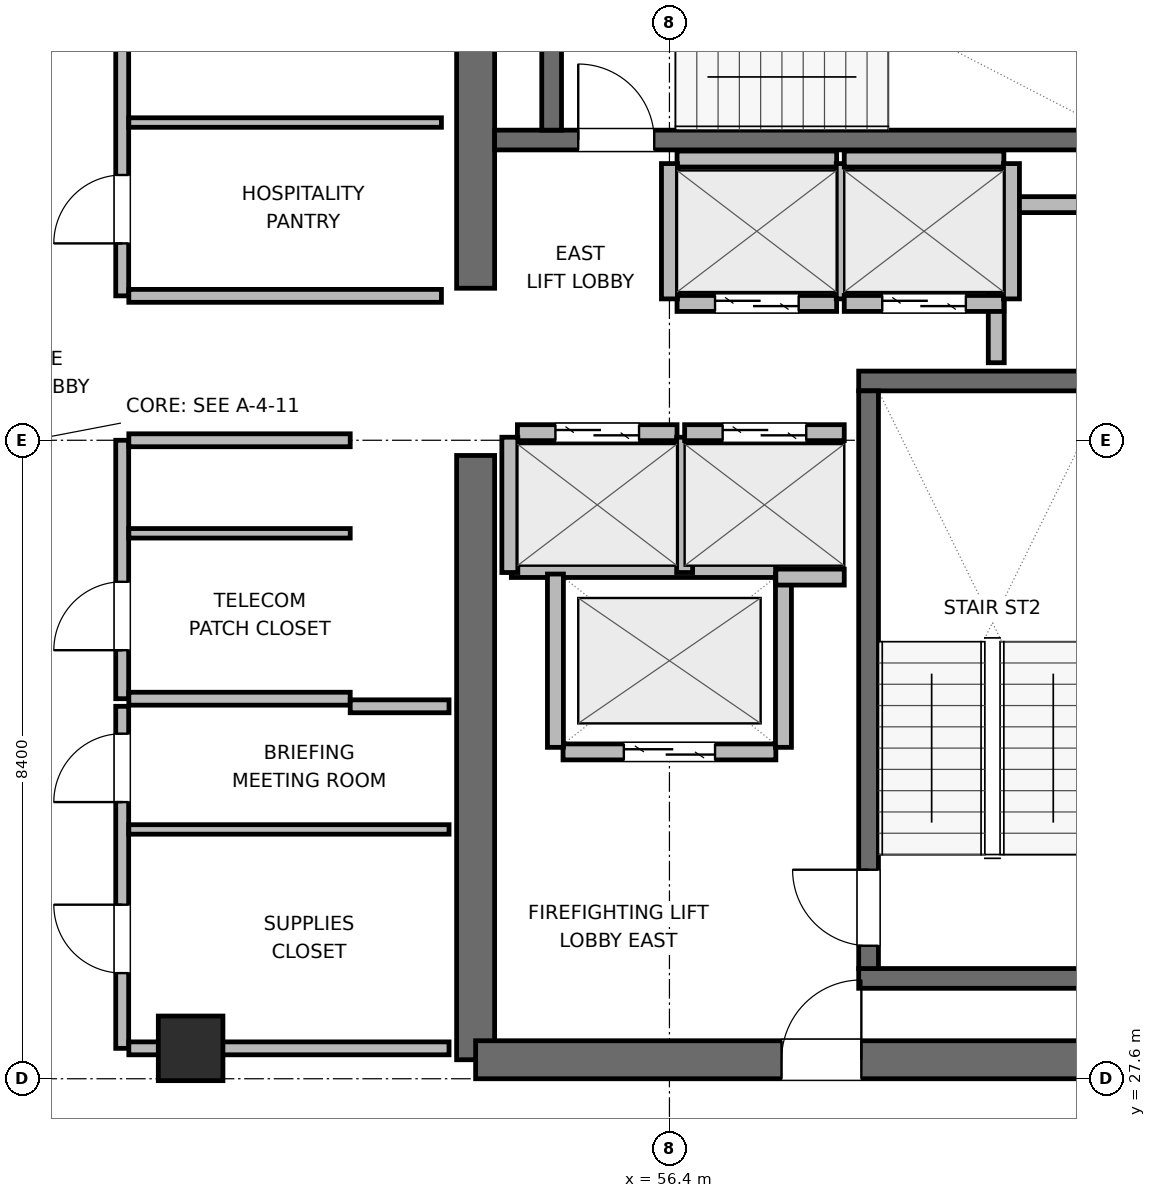
"""IFC4 building model, lengths in metres.
Left out: names, types, materials, properties, quantities, classifications, styles, units other than length and angle.
Written with IfcOpenShell. Run it as: python <this file> out.ifc"""

import sys

from ifc_helpers import new_model, si_unit, direction, frame, frame_2d, origin, origin_2d, place, context, subcontext, project, spatial, rectangle, extrude, element, fill, save


model = new_model("IFC4")
c1 = context("Model", 3, precision=1e-05, world=origin(), true_north=direction((0.0, 1.0)))
c2 = subcontext(c1, "Body", "Model", "MODEL_VIEW")
j1 = project(units=[si_unit("LENGTHUNIT", "METRE"), si_unit("PLANEANGLEUNIT", "RADIAN")], contexts=[c1])
p1 = place(None, origin())
s1 = spatial("IfcSite", under=j1, at=p1, CompositionType="ELEMENT")
p2 = place(p1, origin())
s2 = spatial("IfcBuilding", under=s1, at=p2, CompositionType="ELEMENT")
p3 = place(p2, frame((0.0, 0.0, 270.6)))
s3 = spatial("IfcBuildingStorey", under=s2, at=p3, CompositionType="ELEMENT", Elevation=270.6)
p4 = place(p3, frame((53.85, 27.85, 0.0), z_axis=(0.0, 0.0, 1.0), x_axis=(0.0, 1.0, 0.0)))
e1 = element("IfcWall", 1, at=p4, inside=s3, PredefinedType="SHEAR", context=c2, shape_type="SweptSolid", body=[
    extrude(rectangle(XDim=7.95, YDim=0.5, at=frame_2d((3.975, 0.0))), origin(), (0.0, 0.0, 1.0), 3.9),
])
p5 = place(p3, frame((53.85, 38.0, 0.0), z_axis=(0.0, 0.0, 1.0), x_axis=(0.0, 1.0, 0.0)))
e2 = element("IfcWall", 2, at=p5, inside=s3, PredefinedType="SHEAR", context=c2, shape_type="SweptSolid", body=[
    extrude(rectangle(XDim=6.15, YDim=0.5, at=frame_2d((3.075, 0.0))), origin(), (0.0, 0.0, 1.0), 3.9),
])
p6 = place(p3, frame((53.85, 27.85, 0.0), z_axis=(0.0, 0.0, 1.0), x_axis=(1.0, 0.0, 0.0)))
e3 = element("IfcWall", 3, at=p6, inside=s3, PredefinedType="SHEAR", context=c2, shape_type="SweptSolid", body=[
    extrude(rectangle(XDim=9.5, YDim=0.5, at=frame_2d((4.75, 0.0))), origin(), (0.0, 0.0, 1.0), 3.9),
])
p7 = place(p6, frame((4.025, 0.0, 0.0)))
e4 = element("IfcOpeningElement", 4, at=p7, cuts=e3, PredefinedType="OPENING", context=c2, shape_type="SweptSolid", body=[
    extrude(rectangle(XDim=1.05, YDim=2.04, at=frame_2d((0.525, 1.02))), frame((0.0, 0.26, 0.0), z_axis=(0.0, -1.0, 0.0), x_axis=(1.0, 0.0, 0.0)), (0.0, 0.0, 1.0), 0.52),
])
for number, where, z_axis, x_axis in (
    (5, (58.89, 28.92, 0.0), (0.0, 0.0, 1.0), (1.0, 0.0, 0.0)),
    (6, (58.89, 36.78, 0.0), (0.0, 0.0, 1.0), (1.0, 0.0, 0.0)),
):
    element("IfcWall", number, at=place(p3, frame(where, z_axis=z_axis, x_axis=x_axis)), inside=s3, PredefinedType="SHEAR", context=c2, shape_type="SweptSolid", body=[
        extrude(rectangle(XDim=4.21, YDim=0.26, at=frame_2d((2.105, 0.0))), origin(), (0.0, 0.0, 1.0), 3.9),
    ])
p8 = place(p3, frame((59.02, 29.05, 0.0), z_axis=(0.0, 0.0, 1.0), x_axis=(0.0, 1.0, 0.0)))
e7 = element("IfcWall", 7, at=p8, inside=s3, PredefinedType="SHEAR", context=c2, shape_type="SweptSolid", body=[
    extrude(rectangle(XDim=7.6, YDim=0.26, at=frame_2d((3.8, 0.0))), origin(), (0.0, 0.0, 1.0), 3.9),
])
p9 = place(p8, frame((0.3, 0.0, 0.0)))
e8 = element("IfcOpeningElement", 8, at=p9, cuts=e7, PredefinedType="OPENING", context=c2, shape_type="SweptSolid", body=[
    extrude(rectangle(XDim=1.0, YDim=2.04, at=frame_2d((0.5, 1.02))), frame((0.0, 0.14, 0.0), z_axis=(0.0, -1.0, 0.0), x_axis=(1.0, 0.0, 0.0)), (0.0, 0.0, 1.0), 0.28),
])
p10 = place(p3, frame((54.1, 39.95, 0.0), z_axis=(0.0, 0.0, 1.0), x_axis=(1.0, 0.0, 0.0)))
e9 = element("IfcWall", 9, at=p10, inside=s3, PredefinedType="SHEAR", context=c2, shape_type="SweptSolid", body=[
    extrude(rectangle(XDim=9.0, YDim=0.26, at=frame_2d((4.5, 0.0))), origin(), (0.0, 0.0, 1.0), 3.9),
])
p11 = place(p10, frame((1.1, 0.0, 0.0)))
e10 = element("IfcOpeningElement", 10, at=p11, cuts=e9, PredefinedType="OPENING", context=c2, shape_type="SweptSolid", body=[
    extrude(rectangle(XDim=1.0, YDim=2.04, at=frame_2d((0.5, 1.02))), frame((0.0, 0.14, 0.0), z_axis=(0.0, -1.0, 0.0), x_axis=(1.0, 0.0, 0.0)), (0.0, 0.0, 1.0), 0.28),
])
p12 = place(p3, frame((54.85, 40.08, 0.0), z_axis=(0.0, 0.0, 1.0), x_axis=(0.0, 1.0, 0.0)))
e11 = element("IfcWall", 11, at=p12, inside=s3, PredefinedType="SHEAR", context=c2, shape_type="SweptSolid", body=[
    extrude(rectangle(XDim=2.94, YDim=0.26, at=frame_2d((1.47, 0.0))), origin(), (0.0, 0.0, 1.0), 3.9),
])
p13 = place(p3, frame((50.1, 28.0, 0.0), z_axis=(0.0, 0.0, 1.0), x_axis=(1.0, 0.0, 0.0)))
e12 = element("IfcColumn", 12, at=p13, inside=s3, PredefinedType="COLUMN", context=c2, shape_type="SweptSolid", body=[
    extrude(rectangle(XDim=0.85, YDim=0.85, at=origin_2d()), origin(), (0.0, 0.0, 1.0), 3.9),
])
p14 = place(p3, frame((60.72, 39.1, 0.0), z_axis=(0.0, 0.0, 1.0), x_axis=(1.0, 0.0, 0.0)))
e13 = element("IfcWall", 13, at=p14, inside=s3, PredefinedType="PARTITIONING", context=c2, shape_type="SweptSolid", body=[
    extrude(rectangle(XDim=1.8, YDim=0.21, at=frame_2d((0.9, 0.0))), origin(), (0.0, 0.0, 1.0), 3.68),
])
p15 = place(p3, frame((60.7, 37.02, 0.0), z_axis=(0.0, 0.0, 1.0), x_axis=(0.0, 1.0, 0.0)))
e14 = element("IfcWall", 14, at=p15, inside=s3, PredefinedType="PARTITIONING", context=c2, shape_type="SweptSolid", body=[
    extrude(rectangle(XDim=1.96, YDim=0.21, at=frame_2d((0.98, 0.0))), origin(), (0.0, 0.0, 1.0), 3.68),
])
p16 = place(p3, frame((55.0, 31.9, 0.0), z_axis=(0.0, 0.0, 1.0), x_axis=(1.0, 0.0, 0.0)))
e15 = element("IfcWall", 15, at=p16, inside=s3, PredefinedType="PARTITIONING", context=c2, shape_type="SweptSolid", body=[
    extrude(rectangle(XDim=2.8, YDim=0.21, at=frame_2d((1.4, 0.0))), origin(), (0.0, 0.0, 1.0), 3.68),
])
p17 = place(p16, frame((0.8, 0.0, 0.0)))
e16 = element("IfcOpeningElement", 16, at=p17, cuts=e15, PredefinedType="OPENING", context=c2, shape_type="SweptSolid", body=[
    extrude(rectangle(XDim=1.2, YDim=2.04, at=frame_2d((0.6, 1.02))), frame((0.0, 0.115, 0.0), z_axis=(0.0, -1.0, 0.0), x_axis=(1.0, 0.0, 0.0)), (0.0, 0.0, 1.0), 0.23),
])
p18 = place(p3, frame((54.32, 34.3, 0.0), z_axis=(0.0, 0.0, 1.0), x_axis=(1.0, 0.0, 0.0)))
e17 = element("IfcWall", 17, at=p18, inside=s3, PredefinedType="PARTITIONING", context=c2, shape_type="SweptSolid", body=[
    extrude(rectangle(XDim=3.48, YDim=0.21, at=frame_2d((1.74, 0.0))), origin(), (0.0, 0.0, 1.0), 3.68),
])
for number, where, z_axis, x_axis in (
    (18, (54.9, 31.96, 0.0), (0.0, 0.0, 1.0), (0.0, 1.0, 0.0)),
    (19, (57.9, 31.96, 0.0), (0.0, 0.0, 1.0), (0.0, 1.0, 0.0)),
):
    element("IfcWall", number, at=place(p3, frame(where, z_axis=z_axis, x_axis=x_axis)), inside=s3, PredefinedType="PARTITIONING", context=c2, shape_type="SweptSolid", body=[
        extrude(rectangle(XDim=2.28, YDim=0.21, at=frame_2d((1.14, 0.0))), origin(), (0.0, 0.0, 1.0), 3.68),
    ])
p19 = place(p3, frame((54.4, 36.1, 0.0), z_axis=(0.0, 0.0, 1.0), x_axis=(1.0, 0.0, 0.0)))
e20 = element("IfcWall", 20, at=p19, inside=s3, PredefinedType="PARTITIONING", context=c2, shape_type="SweptSolid", body=[
    extrude(rectangle(XDim=2.1, YDim=0.21, at=frame_2d((1.05, 0.0))), origin(), (0.0, 0.0, 1.0), 3.68),
])
p20 = place(p19, frame((0.5, 0.0, 0.0)))
e21 = element("IfcOpeningElement", 21, at=p20, cuts=e20, PredefinedType="OPENING", context=c2, shape_type="SweptSolid", body=[
    extrude(rectangle(XDim=1.1, YDim=2.04, at=frame_2d((0.55, 1.02))), frame((0.0, 0.115, 0.0), z_axis=(0.0, -1.0, 0.0), x_axis=(1.0, 0.0, 0.0)), (0.0, 0.0, 1.0), 0.23),
])
for number, where, z_axis, x_axis in (
    (22, (54.3, 34.26, 0.0), (0.0, 0.0, 1.0), (0.0, 1.0, 0.0)),
    (23, (56.6, 34.26, 0.0), (0.0, 0.0, 1.0), (0.0, 1.0, 0.0)),
):
    element("IfcWall", number, at=place(p3, frame(where, z_axis=z_axis, x_axis=x_axis)), inside=s3, PredefinedType="PARTITIONING", context=c2, shape_type="SweptSolid", body=[
        extrude(rectangle(XDim=1.78, YDim=0.21, at=frame_2d((0.89, 0.0))), origin(), (0.0, 0.0, 1.0), 3.68),
    ])
p21 = place(p3, frame((56.6, 36.1, 0.0), z_axis=(0.0, 0.0, 1.0), x_axis=(1.0, 0.0, 0.0)))
e24 = element("IfcWall", 24, at=p21, inside=s3, PredefinedType="PARTITIONING", context=c2, shape_type="SweptSolid", body=[
    extrude(rectangle(XDim=2.1, YDim=0.21, at=frame_2d((1.05, 0.0))), origin(), (0.0, 0.0, 1.0), 3.68),
])
p22 = place(p21, frame((0.5, 0.0, 0.0)))
e25 = element("IfcOpeningElement", 25, at=p22, cuts=e24, PredefinedType="OPENING", context=c2, shape_type="SweptSolid", body=[
    extrude(rectangle(XDim=1.1, YDim=2.04, at=frame_2d((0.55, 1.02))), frame((0.0, 0.115, 0.0), z_axis=(0.0, -1.0, 0.0), x_axis=(1.0, 0.0, 0.0)), (0.0, 0.0, 1.0), 0.23),
])
p23 = place(p3, frame((57.8, 34.2, 0.0), z_axis=(0.0, 0.0, 1.0), x_axis=(1.0, 0.0, 0.0)))
e26 = element("IfcWall", 26, at=p23, inside=s3, PredefinedType="PARTITIONING", context=c2, shape_type="SweptSolid", body=[
    extrude(rectangle(XDim=0.9, YDim=0.21, at=frame_2d((0.45, 0.0))), origin(), (0.0, 0.0, 1.0), 3.68),
])
p24 = place(p3, frame((56.5, 37.8, 0.0), z_axis=(0.0, 0.0, 1.0), x_axis=(1.0, 0.0, 0.0)))
e27 = element("IfcWall", 27, at=p24, inside=s3, PredefinedType="PARTITIONING", context=c2, shape_type="SweptSolid", body=[
    extrude(rectangle(XDim=2.1, YDim=0.21, at=frame_2d((1.05, 0.0))), origin(), (0.0, 0.0, 1.0), 3.68),
])
p25 = place(p24, frame((0.5, 0.0, 0.0)))
e28 = element("IfcOpeningElement", 28, at=p25, cuts=e27, PredefinedType="OPENING", context=c2, shape_type="SweptSolid", body=[
    extrude(rectangle(XDim=1.1, YDim=2.04, at=frame_2d((0.55, 1.02))), frame((0.0, 0.115, 0.0), z_axis=(0.0, -1.0, 0.0), x_axis=(1.0, 0.0, 0.0)), (0.0, 0.0, 1.0), 0.23),
])
p26 = place(p3, frame((56.5, 39.7, 0.0), z_axis=(0.0, 0.0, 1.0), x_axis=(1.0, 0.0, 0.0)))
e29 = element("IfcWall", 29, at=p26, inside=s3, PredefinedType="PARTITIONING", context=c2, shape_type="SweptSolid", body=[
    extrude(rectangle(XDim=2.1, YDim=0.21, at=frame_2d((1.05, 0.0))), origin(), (0.0, 0.0, 1.0), 3.68),
])
for number, where, z_axis, x_axis in (
    (30, (56.4, 37.86, 0.0), (0.0, 0.0, 1.0), (0.0, 1.0, 0.0)),
    (31, (58.7, 37.86, 0.0), (0.0, 0.0, 1.0), (0.0, 1.0, 0.0)),
):
    element("IfcWall", number, at=place(p3, frame(where, z_axis=z_axis, x_axis=x_axis)), inside=s3, PredefinedType="PARTITIONING", context=c2, shape_type="SweptSolid", body=[
        extrude(rectangle(XDim=1.78, YDim=0.21, at=frame_2d((0.89, 0.0))), origin(), (0.0, 0.0, 1.0), 3.68),
    ])
p27 = place(p3, frame((58.7, 37.8, 0.0), z_axis=(0.0, 0.0, 1.0), x_axis=(1.0, 0.0, 0.0)))
e32 = element("IfcWall", 32, at=p27, inside=s3, PredefinedType="PARTITIONING", context=c2, shape_type="SweptSolid", body=[
    extrude(rectangle(XDim=2.1, YDim=0.21, at=frame_2d((1.05, 0.0))), origin(), (0.0, 0.0, 1.0), 3.68),
])
p28 = place(p27, frame((0.5, 0.0, 0.0)))
e33 = element("IfcOpeningElement", 33, at=p28, cuts=e32, PredefinedType="OPENING", context=c2, shape_type="SweptSolid", body=[
    extrude(rectangle(XDim=1.1, YDim=2.04, at=frame_2d((0.55, 1.02))), frame((0.0, 0.115, 0.0), z_axis=(0.0, -1.0, 0.0), x_axis=(1.0, 0.0, 0.0)), (0.0, 0.0, 1.0), 0.23),
])
p29 = place(p3, frame((58.7, 39.7, 0.0), z_axis=(0.0, 0.0, 1.0), x_axis=(1.0, 0.0, 0.0)))
e34 = element("IfcWall", 34, at=p29, inside=s3, PredefinedType="PARTITIONING", context=c2, shape_type="SweptSolid", body=[
    extrude(rectangle(XDim=2.1, YDim=0.21, at=frame_2d((1.05, 0.0))), origin(), (0.0, 0.0, 1.0), 3.68),
])
p30 = place(p3, frame((60.9, 37.86, 0.0), z_axis=(0.0, 0.0, 1.0), x_axis=(0.0, 1.0, 0.0)))
e35 = element("IfcWall", 35, at=p30, inside=s3, PredefinedType="PARTITIONING", context=c2, shape_type="SweptSolid", body=[
    extrude(rectangle(XDim=1.78, YDim=0.21, at=frame_2d((0.89, 0.0))), origin(), (0.0, 0.0, 1.0), 3.68),
])
p31 = place(p3, frame((49.2, 32.6, 0.0), z_axis=(0.0, 0.0, 1.0), x_axis=(0.0, 1.0, 0.0)))
e36 = element("IfcWall", 36, at=p31, inside=s3, PredefinedType="PARTITIONING", context=c2, shape_type="SweptSolid", body=[
    extrude(rectangle(XDim=3.4, YDim=0.17, at=frame_2d((1.7, 0.0))), origin(), (0.0, 0.0, 1.0), 3.68),
])
p32 = place(p31, frame((0.638, 0.0, 0.0)))
e37 = element("IfcOpeningElement", 37, at=p32, cuts=e36, PredefinedType="OPENING", context=c2, shape_type="SweptSolid", body=[
    extrude(rectangle(XDim=0.9, YDim=2.02, at=frame_2d((0.45, 1.01))), frame((0.0, 0.095, 0.0), z_axis=(0.0, -1.0, 0.0), x_axis=(1.0, 0.0, 0.0)), (0.0, 0.0, 1.0), 0.19),
])
for number, where, z_axis, x_axis in (
    (38, (49.287, 32.6, 0.0), (0.0, 0.0, 1.0), (1.0, 0.0, 0.0)),
    (39, (49.287, 36.0, 0.0), (0.0, 0.0, 1.0), (1.0, 0.0, 0.0)),
):
    element("IfcWall", number, at=place(p3, frame(where, z_axis=z_axis, x_axis=x_axis)), inside=s3, PredefinedType="PARTITIONING", context=c2, shape_type="SweptSolid", body=[
        extrude(rectangle(XDim=2.913, YDim=0.17, at=frame_2d((1.457, 0.0))), origin(), (0.0, 0.0, 1.0), 3.68),
    ])
p33 = place(p3, frame((49.287, 34.776, 0.0), z_axis=(0.0, 0.0, 1.0), x_axis=(1.0, 0.0, 0.0)))
e40 = element("IfcWall", 40, at=p33, inside=s3, PredefinedType="PARTITIONING", context=c2, shape_type="SweptSolid", body=[
    extrude(rectangle(XDim=2.913, YDim=0.125, at=frame_2d((1.457, 0.0))), origin(), (0.0, 0.0, 1.0), 3.68),
])
p34 = place(p3, frame((49.2, 28.0, 0.0), z_axis=(0.0, 0.0, 1.0), x_axis=(0.0, 1.0, 0.0)))
e41 = element("IfcWall", 41, at=p34, inside=s3, PredefinedType="PARTITIONING", context=c2, shape_type="SweptSolid", body=[
    extrude(rectangle(XDim=4.5, YDim=0.17, at=frame_2d((2.25, 0.0))), origin(), (0.0, 0.0, 1.0), 3.68),
])
p35 = place(p34, frame((0.99, 0.0, 0.0)))
e42 = element("IfcOpeningElement", 42, at=p35, cuts=e41, PredefinedType="OPENING", context=c2, shape_type="SweptSolid", body=[
    extrude(rectangle(XDim=0.9, YDim=2.02, at=frame_2d((0.45, 1.01))), frame((0.0, 0.095, 0.0), z_axis=(0.0, -1.0, 0.0), x_axis=(1.0, 0.0, 0.0)), (0.0, 0.0, 1.0), 0.19),
])
p36 = place(p34, frame((3.24, 0.0, 0.0)))
e43 = element("IfcOpeningElement", 43, at=p36, cuts=e41, PredefinedType="OPENING", context=c2, shape_type="SweptSolid", body=[
    extrude(rectangle(XDim=0.9, YDim=2.02, at=frame_2d((0.45, 1.01))), frame((0.0, 0.095, 0.0), z_axis=(0.0, -1.0, 0.0), x_axis=(1.0, 0.0, 0.0)), (0.0, 0.0, 1.0), 0.19),
])
p37 = place(p3, frame((49.287, 28.0, 0.0), z_axis=(0.0, 0.0, 1.0), x_axis=(1.0, 0.0, 0.0)))
e44 = element("IfcWall", 44, at=p37, inside=s3, PredefinedType="PARTITIONING", context=c2, shape_type="SweptSolid", body=[
    extrude(rectangle(XDim=4.213, YDim=0.17, at=frame_2d((2.106, 0.0))), origin(), (0.0, 0.0, 1.0), 2.765),
])
p38 = place(p3, frame((52.2, 32.5, 0.0), z_axis=(0.0, 0.0, 1.0), x_axis=(1.0, 0.0, 0.0)))
e45 = element("IfcWall", 45, at=p38, inside=s3, PredefinedType="PARTITIONING", context=c2, shape_type="SweptSolid", body=[
    extrude(rectangle(XDim=1.3, YDim=0.17, at=frame_2d((0.65, 0.0))), origin(), (0.0, 0.0, 1.0), 3.68),
])
p39 = place(p3, frame((49.287, 30.88, 0.0), z_axis=(0.0, 0.0, 1.0), x_axis=(1.0, 0.0, 0.0)))
e46 = element("IfcWall", 46, at=p39, inside=s3, PredefinedType="PARTITIONING", context=c2, shape_type="SweptSolid", body=[
    extrude(rectangle(XDim=4.213, YDim=0.125, at=frame_2d((2.106, 0.0))), origin(), (0.0, 0.0, 1.0), 3.68),
])
p40 = place(p3, frame((49.2, 37.9, 0.0), z_axis=(0.0, 0.0, 1.0), x_axis=(0.0, 1.0, 0.0)))
e47 = element("IfcWall", 47, at=p40, inside=s3, PredefinedType="PARTITIONING", context=c2, shape_type="SweptSolid", body=[
    extrude(rectangle(XDim=6.0, YDim=0.17, at=frame_2d((3.0, 0.0))), origin(), (0.0, 0.0, 1.0), 3.68),
])
p41 = place(p40, frame((0.69, 0.0, 0.0)))
e48 = element("IfcOpeningElement", 48, at=p41, cuts=e47, PredefinedType="OPENING", context=c2, shape_type="SweptSolid", body=[
    extrude(rectangle(XDim=0.9, YDim=2.02, at=frame_2d((0.45, 1.01))), frame((0.0, 0.095, 0.0), z_axis=(0.0, -1.0, 0.0), x_axis=(1.0, 0.0, 0.0)), (0.0, 0.0, 1.0), 0.19),
])
p42 = place(p40, frame((3.69, 0.0, 0.0)))
e49 = element("IfcOpeningElement", 49, at=p42, cuts=e47, PredefinedType="OPENING", context=c2, shape_type="SweptSolid", body=[
    extrude(rectangle(XDim=0.9, YDim=2.02, at=frame_2d((0.45, 1.01))), frame((0.0, 0.095, 0.0), z_axis=(0.0, -1.0, 0.0), x_axis=(1.0, 0.0, 0.0)), (0.0, 0.0, 1.0), 0.19),
])
p43 = place(p3, frame((49.287, 37.9, 0.0), z_axis=(0.0, 0.0, 1.0), x_axis=(1.0, 0.0, 0.0)))
e50 = element("IfcWall", 50, at=p43, inside=s3, PredefinedType="PARTITIONING", context=c2, shape_type="SweptSolid", body=[
    extrude(rectangle(XDim=4.113, YDim=0.17, at=frame_2d((2.056, 0.0))), origin(), (0.0, 0.0, 1.0), 3.68),
])
p44 = place(p3, frame((49.287, 40.18, 0.0), z_axis=(0.0, 0.0, 1.0), x_axis=(1.0, 0.0, 0.0)))
e51 = element("IfcWall", 51, at=p44, inside=s3, PredefinedType="PARTITIONING", context=c2, shape_type="SweptSolid", body=[
    extrude(rectangle(XDim=4.113, YDim=0.125, at=frame_2d((2.056, 0.0))), origin(), (0.0, 0.0, 1.0), 3.68),
])
p45 = place(p9, origin())
e52 = element("IfcDoor", 52, at=p45, inside=s3, OperationType="SINGLE_SWING_RIGHT", PredefinedType="DOOR", context=c2, shape_type="SweptSolid", body=[
    extrude(rectangle(XDim=1.0, YDim=2.04, at=frame_2d((0.5, 1.02))), frame((0.0, 0.025, 0.0), z_axis=(0.0, -1.0, 0.0), x_axis=(1.0, 0.0, 0.0)), (0.0, 0.0, 1.0), 0.05),
])
fill(e8, e52)
p46 = place(p11, origin())
e53 = element("IfcDoor", 53, at=p46, inside=s3, OperationType="SINGLE_SWING_LEFT", PredefinedType="DOOR", context=c2, shape_type="SweptSolid", body=[
    extrude(rectangle(XDim=1.0, YDim=2.04, at=frame_2d((0.5, 1.02))), frame((0.0, 0.025, 0.0), z_axis=(0.0, -1.0, 0.0), x_axis=(1.0, 0.0, 0.0)), (0.0, 0.0, 1.0), 0.05),
])
fill(e10, e53)
p47 = place(p17, origin())
e54 = element("IfcDoor", 54, at=p47, inside=s3, OperationType="DOUBLE_DOOR_SLIDING", PredefinedType="DOOR", context=c2, shape_type="SweptSolid", body=[
    extrude(rectangle(XDim=1.2, YDim=2.04, at=frame_2d((0.6, 1.02))), frame((0.0, 0.025, 0.0), z_axis=(0.0, -1.0, 0.0), x_axis=(1.0, 0.0, 0.0)), (0.0, 0.0, 1.0), 0.05),
])
fill(e16, e54)
p48 = place(p20, origin())
e55 = element("IfcDoor", 55, at=p48, inside=s3, OperationType="DOUBLE_DOOR_SLIDING", PredefinedType="DOOR", context=c2, shape_type="SweptSolid", body=[
    extrude(rectangle(XDim=1.1, YDim=2.04, at=frame_2d((0.55, 1.02))), frame((0.0, 0.025, 0.0), z_axis=(0.0, -1.0, 0.0), x_axis=(1.0, 0.0, 0.0)), (0.0, 0.0, 1.0), 0.05),
])
fill(e21, e55)
p49 = place(p22, origin())
e56 = element("IfcDoor", 56, at=p49, inside=s3, OperationType="DOUBLE_DOOR_SLIDING", PredefinedType="DOOR", context=c2, shape_type="SweptSolid", body=[
    extrude(rectangle(XDim=1.1, YDim=2.04, at=frame_2d((0.55, 1.02))), frame((0.0, 0.025, 0.0), z_axis=(0.0, -1.0, 0.0), x_axis=(1.0, 0.0, 0.0)), (0.0, 0.0, 1.0), 0.05),
])
fill(e25, e56)
p50 = place(p25, origin())
e57 = element("IfcDoor", 57, at=p50, inside=s3, OperationType="DOUBLE_DOOR_SLIDING", PredefinedType="DOOR", context=c2, shape_type="SweptSolid", body=[
    extrude(rectangle(XDim=1.1, YDim=2.04, at=frame_2d((0.55, 1.02))), frame((0.0, 0.025, 0.0), z_axis=(0.0, -1.0, 0.0), x_axis=(1.0, 0.0, 0.0)), (0.0, 0.0, 1.0), 0.05),
])
fill(e28, e57)
p51 = place(p28, origin())
e58 = element("IfcDoor", 58, at=p51, inside=s3, OperationType="DOUBLE_DOOR_SLIDING", PredefinedType="DOOR", context=c2, shape_type="SweptSolid", body=[
    extrude(rectangle(XDim=1.1, YDim=2.04, at=frame_2d((0.55, 1.02))), frame((0.0, 0.025, 0.0), z_axis=(0.0, -1.0, 0.0), x_axis=(1.0, 0.0, 0.0)), (0.0, 0.0, 1.0), 0.05),
])
fill(e33, e58)
p52 = place(p7, origin())
e59 = element("IfcDoor", 59, at=p52, inside=s3, OperationType="SINGLE_SWING_RIGHT", PredefinedType="DOOR", context=c2, shape_type="SweptSolid", body=[
    extrude(rectangle(XDim=1.05, YDim=2.04, at=frame_2d((0.525, 1.02))), frame((0.0, 0.025, 0.0), z_axis=(0.0, -1.0, 0.0), x_axis=(1.0, 0.0, 0.0)), (0.0, 0.0, 1.0), 0.05),
])
fill(e4, e59)
p53 = place(p32, origin())
e60 = element("IfcDoor", 60, at=p53, inside=s3, OperationType="SINGLE_SWING_LEFT", PredefinedType="DOOR", context=c2, shape_type="SweptSolid", body=[
    extrude(rectangle(XDim=0.9, YDim=2.02, at=frame_2d((0.45, 1.01))), frame((0.0, 0.025, 0.0), z_axis=(0.0, -1.0, 0.0), x_axis=(1.0, 0.0, 0.0)), (0.0, 0.0, 1.0), 0.05),
])
fill(e37, e60)
p54 = place(p35, origin())
e61 = element("IfcDoor", 61, at=p54, inside=s3, OperationType="SINGLE_SWING_RIGHT", PredefinedType="DOOR", context=c2, shape_type="SweptSolid", body=[
    extrude(rectangle(XDim=0.9, YDim=2.02, at=frame_2d((0.45, 1.01))), frame((0.0, 0.025, 0.0), z_axis=(0.0, -1.0, 0.0), x_axis=(1.0, 0.0, 0.0)), (0.0, 0.0, 1.0), 0.05),
])
fill(e42, e61)
p55 = place(p36, origin())
e62 = element("IfcDoor", 62, at=p55, inside=s3, OperationType="SINGLE_SWING_LEFT", PredefinedType="DOOR", context=c2, shape_type="SweptSolid", body=[
    extrude(rectangle(XDim=0.9, YDim=2.02, at=frame_2d((0.45, 1.01))), frame((0.0, 0.025, 0.0), z_axis=(0.0, -1.0, 0.0), x_axis=(1.0, 0.0, 0.0)), (0.0, 0.0, 1.0), 0.05),
])
fill(e43, e62)
p56 = place(p41, origin())
e63 = element("IfcDoor", 63, at=p56, inside=s3, OperationType="SINGLE_SWING_LEFT", PredefinedType="DOOR", context=c2, shape_type="SweptSolid", body=[
    extrude(rectangle(XDim=0.9, YDim=2.02, at=frame_2d((0.45, 1.01))), frame((0.0, 0.025, 0.0), z_axis=(0.0, -1.0, 0.0), x_axis=(1.0, 0.0, 0.0)), (0.0, 0.0, 1.0), 0.05),
])
fill(e48, e63)
save(model, sys.argv[1])
